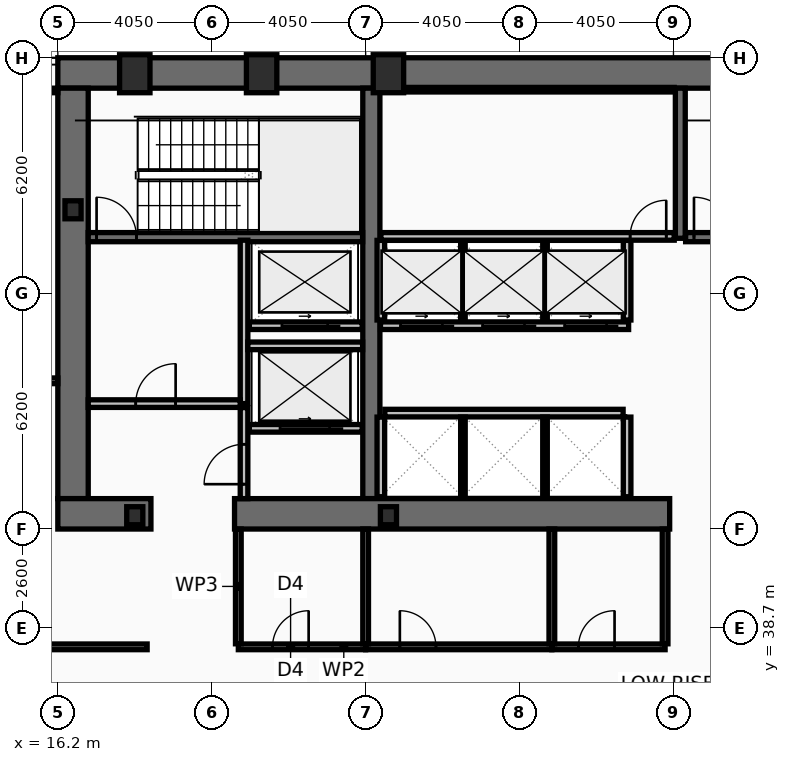
"""IFC4 building model, lengths in metres.
Left out: names, types, materials, properties, quantities, classifications, styles, units other than length and angle.
Written with IfcOpenShell. Run it as: python <this file> out.ifc"""

import sys

from ifc_helpers import new_model, si_unit, direction, frame, frame_2d, origin, origin_2d, place, context, subcontext, project, spatial, rectangle, hollow_rectangle, i_section, extrude, element, fill, save


model = new_model("IFC4")
c1 = context("Model", 3, precision=1e-05, world=origin(), true_north=direction((0.0, 1.0)))
c2 = subcontext(c1, "Body", "Model", "MODEL_VIEW")
j1 = project(units=[si_unit("LENGTHUNIT", "METRE"), si_unit("PLANEANGLEUNIT", "RADIAN")], contexts=[c1])
p1 = place(None, origin())
s1 = spatial("IfcSite", under=j1, at=p1, CompositionType="ELEMENT")
p2 = place(p1, origin())
s2 = spatial("IfcBuilding", under=s1, at=p2, CompositionType="ELEMENT")
p3 = place(p2, frame((0.0, 0.0, 61.8)))
s3 = spatial("IfcBuildingStorey", under=s2, at=p3, CompositionType="ELEMENT", Elevation=61.8)
p4 = place(p3, frame((16.2, 53.3, 0.0), z_axis=(0.0, 0.0, 1.0), x_axis=(1.0, 0.0, 0.0)))
e1 = element("IfcWall", 1, at=p4, inside=s3, PredefinedType="SHEAR", context=c2, shape_type="SweptSolid", body=[
    extrude(rectangle(XDim=40.5, YDim=0.8, at=frame_2d((20.25, 0.0))), origin(), (0.0, 0.0, 1.0), 3.82),
])
p5 = place(p3, frame((16.6, 42.1, 0.0), z_axis=(0.0, 0.0, 1.0), x_axis=(0.0, 1.0, 0.0)))
e2 = element("IfcWall", 2, at=p5, inside=s3, PredefinedType="SHEAR", context=c2, shape_type="SweptSolid", body=[
    extrude(rectangle(XDim=10.8, YDim=0.8, at=frame_2d((5.4, 0.0))), origin(), (0.0, 0.0, 1.0), 3.82),
])
p6 = place(p3, frame((24.45, 42.1, 0.0), z_axis=(0.0, 0.0, 1.0), x_axis=(0.0, 1.0, 0.0)))
e3 = element("IfcWall", 3, at=p6, inside=s3, PredefinedType="SHEAR", context=c2, shape_type="SweptSolid", body=[
    extrude(rectangle(XDim=10.8, YDim=0.45, at=frame_2d((5.4, 0.0))), origin(), (0.0, 0.0, 1.0), 3.82),
])
p7 = place(p3, frame((18.65, 41.7, 0.0), z_axis=(0.0, 0.0, 1.0), x_axis=(-1.0, 0.0, 0.0)))
e4 = element("IfcWall", 4, at=p7, inside=s3, PredefinedType="SHEAR", context=c2, shape_type="SweptSolid", body=[
    extrude(rectangle(XDim=2.45, YDim=0.8, at=frame_2d((1.225, 0.0))), origin(), (0.0, 0.0, 1.0), 3.82),
])
p8 = place(p3, frame((32.3, 41.7, 0.0), z_axis=(0.0, 0.0, 1.0), x_axis=(-1.0, 0.0, 0.0)))
e5 = element("IfcWall", 5, at=p8, inside=s3, PredefinedType="SHEAR", context=c2, shape_type="SweptSolid", body=[
    extrude(rectangle(XDim=11.45, YDim=0.8, at=frame_2d((5.725, 0.0))), origin(), (0.0, 0.0, 1.0), 3.82),
])
p9 = place(p3, frame((32.58, 48.95, 0.0), z_axis=(0.0, 0.0, 1.0), x_axis=(0.0, 1.0, 0.0)))
e6 = element("IfcWall", 6, at=p9, inside=s3, PredefinedType="SHEAR", context=c2, shape_type="SweptSolid", body=[
    extrude(rectangle(XDim=3.95, YDim=0.26, at=frame_2d((1.975, 0.0))), origin(), (0.0, 0.0, 1.0), 3.82),
])
p10 = place(p3, frame((17.0, 48.98, 0.0), z_axis=(0.0, 0.0, 1.0), x_axis=(1.0, 0.0, 0.0)))
e7 = element("IfcWall", 7, at=p10, inside=s3, PredefinedType="SHEAR", context=c2, shape_type="SweptSolid", body=[
    extrude(rectangle(XDim=7.22, YDim=0.24, at=frame_2d((3.61, 0.0))), origin(), (0.0, 0.0, 1.0), 3.82),
])
p11 = place(p10, frame((0.22, 0.0, 0.0)))
e8 = element("IfcOpeningElement", 8, at=p11, cuts=e7, PredefinedType="OPENING", context=c2, shape_type="SweptSolid", body=[
    extrude(rectangle(XDim=1.05, YDim=2.15, at=frame_2d((0.525, 1.075))), frame((0.0, 0.13, 0.0), z_axis=(0.0, -1.0, 0.0), x_axis=(1.0, 0.0, 0.0)), (0.0, 0.0, 1.0), 0.26),
])
p12 = place(p3, frame((32.72, 48.98, 0.0), z_axis=(0.0, 0.0, 1.0), x_axis=(1.0, 0.0, 0.0)))
e9 = element("IfcWall", 9, at=p12, inside=s3, PredefinedType="SHEAR", context=c2, shape_type="SweptSolid", body=[
    extrude(rectangle(XDim=7.56, YDim=0.24, at=frame_2d((3.78, 0.0))), origin(), (0.0, 0.0, 1.0), 3.82),
])
p13 = place(p12, frame((0.22, 0.0, 0.0)))
e10 = element("IfcOpeningElement", 10, at=p13, cuts=e9, PredefinedType="OPENING", context=c2, shape_type="SweptSolid", body=[
    extrude(rectangle(XDim=1.05, YDim=2.15, at=frame_2d((0.525, 1.075))), frame((0.0, 0.13, 0.0), z_axis=(0.0, -1.0, 0.0), x_axis=(1.0, 0.0, 0.0)), (0.0, 0.0, 1.0), 0.26),
])
for number, where, z_axis, x_axis in (
    (11, (18.225, 53.28, 0.0), (0.0, 0.0, 1.0), (1.0, 0.0, 0.0)),
    (12, (21.562, 53.28, 0.0), (0.0, 0.0, 1.0), (1.0, 0.0, 0.0)),
    (13, (24.9, 53.28, 0.0), (0.0, 0.0, 1.0), (1.0, 0.0, 0.0)),
):
    element("IfcColumn", number, at=place(p3, frame(where, z_axis=z_axis, x_axis=x_axis)), inside=s3, PredefinedType="COLUMN", context=c2, shape_type="SweptSolid", body=[
        extrude(hollow_rectangle(XDim=0.8, YDim=1.0, WallThickness=0.055, at=origin_2d()), origin(), (0.0, 0.0, 1.0), 4.0),
    ])
for number, where, z_axis, x_axis in (
    (14, (16.6, 49.7, 0.0), (0.0, 0.0, 1.0), (1.0, 0.0, 0.0)),
    (15, (18.225, 41.65, 0.0), (0.0, 0.0, 1.0), (1.0, 0.0, 0.0)),
    (16, (24.9, 41.65, 0.0), (0.0, 0.0, 1.0), (1.0, 0.0, 0.0)),
):
    element("IfcColumn", number, at=place(p3, frame(where, z_axis=z_axis, x_axis=x_axis)), inside=s3, PredefinedType="COLUMN", context=c2, shape_type="SweptSolid", body=[
        extrude(i_section(OverallWidth=0.424, OverallDepth=0.474, WebThickness=0.048, FlangeThickness=0.077, at=origin_2d()), origin(), (0.0, 0.0, 1.0), 4.0),
    ])
p14 = place(p3, frame((24.21, 43.95, 0.0), z_axis=(0.0, 0.0, 1.0), x_axis=(-1.0, 0.0, 0.0)))
e17 = element("IfcWall", 17, at=p14, inside=s3, PredefinedType="PARTITIONING", context=c2, shape_type="SweptSolid", body=[
    extrude(rectangle(XDim=2.97, YDim=0.2, at=frame_2d((1.485, 0.0))), origin(), (0.0, 0.0, 1.0), 3.82),
])
p15 = place(p14, frame((0.86, 0.0, 0.0)))
e18 = element("IfcOpeningElement", 18, at=p15, cuts=e17, PredefinedType="OPENING", context=c2, shape_type="SweptSolid", body=[
    extrude(rectangle(XDim=1.3, YDim=2.18, at=frame_2d((0.65, 1.09))), frame((0.0, 0.11, 0.0), z_axis=(0.0, -1.0, 0.0), x_axis=(1.0, 0.0, 0.0)), (0.0, 0.0, 1.0), 0.22),
])
p16 = place(p3, frame((24.21, 46.65, 0.0), z_axis=(0.0, 0.0, 1.0), x_axis=(-1.0, 0.0, 0.0)))
e19 = element("IfcWall", 19, at=p16, inside=s3, PredefinedType="PARTITIONING", context=c2, shape_type="SweptSolid", body=[
    extrude(rectangle(XDim=2.97, YDim=0.2, at=frame_2d((1.485, 0.0))), origin(), (0.0, 0.0, 1.0), 3.82),
])
p17 = place(p16, frame((0.91, 0.0, 0.0)))
e20 = element("IfcOpeningElement", 20, at=p17, cuts=e19, PredefinedType="OPENING", context=c2, shape_type="SweptSolid", body=[
    extrude(rectangle(XDim=1.2, YDim=2.18, at=frame_2d((0.6, 1.09))), frame((0.0, 0.11, 0.0), z_axis=(0.0, -1.0, 0.0), x_axis=(1.0, 0.0, 0.0)), (0.0, 0.0, 1.0), 0.22),
])
p18 = place(p3, frame((31.22, 46.65, 0.0), z_axis=(0.0, 0.0, 1.0), x_axis=(-1.0, 0.0, 0.0)))
e21 = element("IfcWall", 21, at=p18, inside=s3, PredefinedType="PARTITIONING", context=c2, shape_type="SweptSolid", body=[
    extrude(rectangle(XDim=6.53, YDim=0.2, at=frame_2d((3.265, 0.0))), origin(), (0.0, 0.0, 1.0), 3.82),
])
p19 = place(p18, frame((4.9, 0.0, 0.0)))
e22 = element("IfcOpeningElement", 22, at=p19, cuts=e21, PredefinedType="OPENING", context=c2, shape_type="SweptSolid", body=[
    extrude(rectangle(XDim=1.1, YDim=2.18, at=frame_2d((0.55, 1.09))), frame((0.0, 0.11, 0.0), z_axis=(0.0, -1.0, 0.0), x_axis=(1.0, 0.0, 0.0)), (0.0, 0.0, 1.0), 0.22),
])
p20 = place(p18, frame((2.74, 0.0, 0.0)))
e23 = element("IfcOpeningElement", 23, at=p20, cuts=e21, PredefinedType="OPENING", context=c2, shape_type="SweptSolid", body=[
    extrude(rectangle(XDim=1.1, YDim=2.18, at=frame_2d((0.55, 1.09))), frame((0.0, 0.11, 0.0), z_axis=(0.0, -1.0, 0.0), x_axis=(1.0, 0.0, 0.0)), (0.0, 0.0, 1.0), 0.22),
])
p21 = place(p18, frame((0.58, 0.0, 0.0)))
e24 = element("IfcOpeningElement", 24, at=p21, cuts=e21, PredefinedType="OPENING", context=c2, shape_type="SweptSolid", body=[
    extrude(rectangle(XDim=1.1, YDim=2.18, at=frame_2d((0.55, 1.09))), frame((0.0, 0.11, 0.0), z_axis=(0.0, -1.0, 0.0), x_axis=(1.0, 0.0, 0.0)), (0.0, 0.0, 1.0), 0.22),
])
p22 = place(p3, frame((21.1, 44.6, 0.0), z_axis=(0.0, 0.0, 1.0), x_axis=(0.0, 1.0, 0.0)))
e25 = element("IfcWall", 25, at=p22, inside=s3, PredefinedType="PARTITIONING", context=c2, shape_type="SweptSolid", body=[
    extrude(rectangle(XDim=4.3, YDim=0.2, at=frame_2d((2.15, 0.0))), origin(), (0.0, 0.0, 1.0), 3.82),
])
p23 = place(p3, frame((17.0, 44.6, 0.0), z_axis=(0.0, 0.0, 1.0), x_axis=(1.0, 0.0, 0.0)))
e26 = element("IfcWall", 26, at=p23, inside=s3, PredefinedType="PARTITIONING", context=c2, shape_type="SweptSolid", body=[
    extrude(rectangle(XDim=4.0, YDim=0.2, at=frame_2d((2.0, 0.0))), origin(), (0.0, 0.0, 1.0), 3.82),
])
p24 = place(p23, frame((1.25, 0.0, 0.0)))
e27 = element("IfcOpeningElement", 27, at=p24, cuts=e26, PredefinedType="OPENING", context=c2, shape_type="SweptSolid", body=[
    extrude(rectangle(XDim=1.05, YDim=2.15, at=frame_2d((0.525, 1.075))), frame((0.0, 0.11, 0.0), z_axis=(0.0, -1.0, 0.0), x_axis=(1.0, 0.0, 0.0)), (0.0, 0.0, 1.0), 0.22),
])
p25 = place(p3, frame((21.2, 46.12, 0.0), z_axis=(0.0, 0.0, 1.0), x_axis=(1.0, 0.0, 0.0)))
e28 = element("IfcWall", 28, at=p25, inside=s3, PredefinedType="PARTITIONING", context=c2, shape_type="SweptSolid", body=[
    extrude(rectangle(XDim=3.02, YDim=0.2, at=frame_2d((1.51, 0.0))), origin(), (0.0, 0.0, 1.0), 3.82),
])
p26 = place(p3, frame((21.1, 42.1, 0.0), z_axis=(0.0, 0.0, 1.0), x_axis=(0.0, 1.0, 0.0)))
e29 = element("IfcWall", 29, at=p26, inside=s3, PredefinedType="PARTITIONING", context=c2, shape_type="SweptSolid", body=[
    extrude(rectangle(XDim=2.395, YDim=0.2, at=frame_2d((1.198, 0.0))), origin(), (0.0, 0.0, 1.0), 3.82),
])
p27 = place(p26, frame((0.38, 0.0, 0.0)))
e30 = element("IfcOpeningElement", 30, at=p27, cuts=e29, PredefinedType="OPENING", context=c2, shape_type="SweptSolid", body=[
    extrude(rectangle(XDim=1.05, YDim=2.15, at=frame_2d((0.525, 1.075))), frame((0.0, 0.11, 0.0), z_axis=(0.0, -1.0, 0.0), x_axis=(1.0, 0.0, 0.0)), (0.0, 0.0, 1.0), 0.22),
])
for number, where, z_axis, x_axis in (
    (31, (24.7, 46.8, 0.0), (0.0, 0.0, 1.0), (0.0, 1.0, 0.0)),
    (32, (31.18, 46.8, 0.0), (0.0, 0.0, 1.0), (0.0, 1.0, 0.0)),
):
    element("IfcWall", number, at=place(p3, frame(where, z_axis=z_axis, x_axis=x_axis)), inside=s3, PredefinedType="PARTITIONING", context=c2, shape_type="SweptSolid", body=[
        extrude(rectangle(XDim=2.095, YDim=0.2, at=frame_2d((1.047, 0.0))), origin(), (0.0, 0.0, 1.0), 3.82),
    ])
for number, where, z_axis, x_axis in (
    (33, (26.86, 46.8, 0.0), (0.0, 0.0, 1.0), (0.0, 1.0, 0.0)),
    (34, (29.02, 46.8, 0.0), (0.0, 0.0, 1.0), (0.0, 1.0, 0.0)),
):
    element("IfcWall", number, at=place(p3, frame(where, z_axis=z_axis, x_axis=x_axis)), inside=s3, PredefinedType="PARTITIONING", context=c2, shape_type="SweptSolid", body=[
        extrude(rectangle(XDim=2.095, YDim=0.12, at=frame_2d((1.047, 0.0))), origin(), (0.0, 0.0, 1.0), 3.82),
    ])
p28 = place(p3, frame((24.805, 44.35, 0.0), z_axis=(0.0, 0.0, 1.0), x_axis=(1.0, 0.0, 0.0)))
e35 = element("IfcWall", 35, at=p28, inside=s3, PredefinedType="PARTITIONING", context=c2, shape_type="SweptSolid", body=[
    extrude(rectangle(XDim=6.27, YDim=0.2, at=frame_2d((3.135, 0.0))), origin(), (0.0, 0.0, 1.0), 3.82),
])
for number, where, z_axis, x_axis in (
    (36, (24.7, 42.15, 0.0), (0.0, 0.0, 1.0), (0.0, 1.0, 0.0)),
    (37, (31.18, 42.15, 0.0), (0.0, 0.0, 1.0), (0.0, 1.0, 0.0)),
):
    element("IfcWall", number, at=place(p3, frame(where, z_axis=z_axis, x_axis=x_axis)), inside=s3, PredefinedType="PARTITIONING", context=c2, shape_type="SweptSolid", body=[
        extrude(rectangle(XDim=2.095, YDim=0.2, at=frame_2d((1.048, 0.0))), origin(), (0.0, 0.0, 1.0), 3.82),
    ])
for number, where, z_axis, x_axis in (
    (38, (26.86, 42.15, 0.0), (0.0, 0.0, 1.0), (0.0, 1.0, 0.0)),
    (39, (29.02, 42.15, 0.0), (0.0, 0.0, 1.0), (0.0, 1.0, 0.0)),
):
    element("IfcWall", number, at=place(p3, frame(where, z_axis=z_axis, x_axis=x_axis)), inside=s3, PredefinedType="PARTITIONING", context=c2, shape_type="SweptSolid", body=[
        extrude(rectangle(XDim=2.095, YDim=0.12, at=frame_2d((1.048, 0.0))), origin(), (0.0, 0.0, 1.0), 3.82),
    ])
p29 = place(p3, frame((24.7, 52.86, 0.0), z_axis=(0.0, 0.0, 1.0), x_axis=(1.0, 0.0, 0.0)))
e40 = element("IfcWall", 40, at=p29, inside=s3, PredefinedType="PARTITIONING", context=c2, shape_type="SweptSolid", body=[
    extrude(rectangle(XDim=7.72, YDim=0.12, at=frame_2d((3.86, 0.0))), origin(), (0.0, 0.0, 1.0), 3.82),
])
p30 = place(p3, frame((24.7, 49.0, 0.0), z_axis=(0.0, 0.0, 1.0), x_axis=(1.0, 0.0, 0.0)))
e41 = element("IfcWall", 41, at=p30, inside=s3, PredefinedType="PARTITIONING", context=c2, shape_type="SweptSolid", body=[
    extrude(rectangle(XDim=7.72, YDim=0.2, at=frame_2d((3.86, 0.0))), origin(), (0.0, 0.0, 1.0), 3.82),
])
p31 = place(p30, frame((6.56, 0.0, 0.0)))
e42 = element("IfcOpeningElement", 42, at=p31, cuts=e41, PredefinedType="OPENING", context=c2, shape_type="SweptSolid", body=[
    extrude(rectangle(XDim=0.95, YDim=2.1, at=frame_2d((0.475, 1.05))), frame((0.0, 0.11, 0.0), z_axis=(0.0, -1.0, 0.0), x_axis=(1.0, 0.0, 0.0)), (0.0, 0.0, 1.0), 0.22),
])
p32 = place(p3, frame((20.95, 38.2, 0.0), z_axis=(0.0, 0.0, 1.0), x_axis=(1.0, 0.0, 0.0)))
e43 = element("IfcWall", 43, at=p32, inside=s3, PredefinedType="PARTITIONING", context=c2, shape_type="SweptSolid", body=[
    extrude(rectangle(XDim=3.35, YDim=0.15, at=frame_2d((1.675, 0.0))), origin(), (0.0, 0.0, 1.0), 3.82),
])
p33 = place(p32, frame((0.9, 0.0, 0.0)))
e44 = element("IfcOpeningElement", 44, at=p33, cuts=e43, PredefinedType="OPENING", context=c2, shape_type="SweptSolid", body=[
    extrude(rectangle(XDim=0.95, YDim=2.05, at=frame_2d((0.475, 1.025))), frame((0.0, 0.085, 0.0), z_axis=(0.0, -1.0, 0.0), x_axis=(1.0, 0.0, 0.0)), (0.0, 0.0, 1.0), 0.17),
])
p34 = place(p3, frame((24.3, 38.2, 0.0), z_axis=(0.0, 0.0, 1.0), x_axis=(1.0, 0.0, 0.0)))
e45 = element("IfcWall", 45, at=p34, inside=s3, PredefinedType="PARTITIONING", context=c2, shape_type="SweptSolid", body=[
    extrude(rectangle(XDim=4.9, YDim=0.15, at=frame_2d((2.45, 0.0))), origin(), (0.0, 0.0, 1.0), 3.01),
])
p35 = place(p34, frame((0.9, 0.0, 0.0)))
e46 = element("IfcOpeningElement", 46, at=p35, cuts=e45, PredefinedType="OPENING", context=c2, shape_type="SweptSolid", body=[
    extrude(rectangle(XDim=0.95, YDim=2.05, at=frame_2d((0.475, 1.025))), frame((0.0, 0.085, 0.0), z_axis=(0.0, -1.0, 0.0), x_axis=(1.0, 0.0, 0.0)), (0.0, 0.0, 1.0), 0.17),
])
p36 = place(p3, frame((29.2, 38.2, 0.0), z_axis=(0.0, 0.0, 1.0), x_axis=(1.0, 0.0, 0.0)))
e47 = element("IfcWall", 47, at=p36, inside=s3, PredefinedType="PARTITIONING", context=c2, shape_type="SweptSolid", body=[
    extrude(rectangle(XDim=2.98, YDim=0.15, at=frame_2d((1.49, 0.0))), origin(), (0.0, 0.0, 1.0), 3.01),
])
p37 = place(p36, frame((0.7, 0.0, 0.0)))
e48 = element("IfcOpeningElement", 48, at=p37, cuts=e47, PredefinedType="OPENING", context=c2, shape_type="SweptSolid", body=[
    extrude(rectangle(XDim=0.95, YDim=2.05, at=frame_2d((0.475, 1.025))), frame((0.0, 0.085, 0.0), z_axis=(0.0, -1.0, 0.0), x_axis=(1.0, 0.0, 0.0)), (0.0, 0.0, 1.0), 0.17),
])
for number, where, z_axis, x_axis in (
    (49, (20.95, 38.28, 0.0), (0.0, 0.0, 1.0), (0.0, 1.0, 0.0)),
    (50, (24.3, 38.28, 0.0), (0.0, 0.0, 1.0), (0.0, 1.0, 0.0)),
    (51, (29.2, 38.28, 0.0), (0.0, 0.0, 1.0), (0.0, 1.0, 0.0)),
    (52, (32.18, 38.28, 0.0), (0.0, 0.0, 1.0), (0.0, 1.0, 0.0)),
):
    element("IfcWall", number, at=place(p3, frame(where, z_axis=z_axis, x_axis=x_axis)), inside=s3, PredefinedType="PARTITIONING", context=c2, shape_type="SweptSolid", body=[
        extrude(rectangle(XDim=3.02, YDim=0.15, at=frame_2d((1.51, 0.0))), origin(), (0.0, 0.0, 1.0), 3.82),
    ])
p38 = place(p3, frame((2.03, 38.2, 0.0), z_axis=(0.0, 0.0, 1.0), x_axis=(1.0, 0.0, 0.0)))
e53 = element("IfcWall", 53, at=p38, inside=s3, PredefinedType="PARTITIONING", context=c2, shape_type="SweptSolid", body=[
    extrude(rectangle(XDim=16.52, YDim=0.15, at=frame_2d((8.26, 0.0))), origin(), (0.0, 0.0, 1.0), 3.01),
])
p39 = place(p38, frame((12.32, 0.0, 0.0)))
e54 = element("IfcOpeningElement", 54, at=p39, cuts=e53, PredefinedType="OPENING", context=c2, shape_type="SweptSolid", body=[
    extrude(rectangle(XDim=0.95, YDim=2.05, at=frame_2d((0.475, 1.025))), frame((0.0, 0.085, 0.0), z_axis=(0.0, -1.0, 0.0), x_axis=(1.0, 0.0, 0.0)), (0.0, 0.0, 1.0), 0.17),
])
p40 = place(p3, frame((2.095, 45.2, 0.0), z_axis=(0.0, 0.0, 1.0), x_axis=(1.0, 0.0, 0.0)))
e55 = element("IfcWall", 55, at=p40, inside=s3, PredefinedType="PARTITIONING", context=c2, shape_type="SweptSolid", body=[
    extrude(rectangle(XDim=14.105, YDim=0.15, at=frame_2d((7.052, 0.0))), origin(), (0.0, 0.0, 1.0), 3.16),
])
p41 = place(p40, frame((12.32, 0.0, 0.0)))
e56 = element("IfcOpeningElement", 56, at=p41, cuts=e55, PredefinedType="OPENING", context=c2, shape_type="SweptSolid", body=[
    extrude(rectangle(XDim=0.9, YDim=2.05, at=frame_2d((0.45, 1.025))), frame((0.0, 0.085, 0.0), z_axis=(0.0, -1.0, 0.0), x_axis=(1.0, 0.0, 0.0)), (0.0, 0.0, 1.0), 0.17),
])
p42 = place(p3, frame((2.095, 52.84, 0.0), z_axis=(0.0, 0.0, 1.0), x_axis=(1.0, 0.0, 0.0)))
e57 = element("IfcWall", 57, at=p42, inside=s3, PredefinedType="PARTITIONING", context=c2, shape_type="SweptSolid", body=[
    extrude(rectangle(XDim=14.105, YDim=0.12, at=frame_2d((7.052, 0.0))), origin(), (0.0, 0.0, 1.0), 3.82),
])
p43 = place(p11, origin())
e58 = element("IfcDoor", 58, at=p43, inside=s3, OperationType="SINGLE_SWING_LEFT", PredefinedType="DOOR", context=c2, shape_type="SweptSolid", body=[
    extrude(rectangle(XDim=1.05, YDim=2.15, at=frame_2d((0.525, 1.075))), frame((0.0, 0.025, 0.0), z_axis=(0.0, -1.0, 0.0), x_axis=(1.0, 0.0, 0.0)), (0.0, 0.0, 1.0), 0.05),
])
fill(e8, e58)
p44 = place(p13, origin())
e59 = element("IfcDoor", 59, at=p44, inside=s3, OperationType="SINGLE_SWING_LEFT", PredefinedType="DOOR", context=c2, shape_type="SweptSolid", body=[
    extrude(rectangle(XDim=1.05, YDim=2.15, at=frame_2d((0.525, 1.075))), frame((0.0, 0.025, 0.0), z_axis=(0.0, -1.0, 0.0), x_axis=(1.0, 0.0, 0.0)), (0.0, 0.0, 1.0), 0.05),
])
fill(e10, e59)
p45 = place(p15, origin())
e60 = element("IfcDoor", 60, at=p45, inside=s3, OperationType="SLIDING_TO_LEFT", PredefinedType="DOOR", context=c2, shape_type="SweptSolid", body=[
    extrude(rectangle(XDim=1.3, YDim=2.18, at=frame_2d((0.65, 1.09))), frame((0.0, 0.025, 0.0), z_axis=(0.0, -1.0, 0.0), x_axis=(1.0, 0.0, 0.0)), (0.0, 0.0, 1.0), 0.05),
])
fill(e18, e60)
p46 = place(p17, origin())
e61 = element("IfcDoor", 61, at=p46, inside=s3, OperationType="SLIDING_TO_LEFT", PredefinedType="DOOR", context=c2, shape_type="SweptSolid", body=[
    extrude(rectangle(XDim=1.2, YDim=2.18, at=frame_2d((0.6, 1.09))), frame((0.0, 0.025, 0.0), z_axis=(0.0, -1.0, 0.0), x_axis=(1.0, 0.0, 0.0)), (0.0, 0.0, 1.0), 0.05),
])
fill(e20, e61)
p47 = place(p19, origin())
e62 = element("IfcDoor", 62, at=p47, inside=s3, OperationType="SLIDING_TO_LEFT", PredefinedType="DOOR", context=c2, shape_type="SweptSolid", body=[
    extrude(rectangle(XDim=1.1, YDim=2.18, at=frame_2d((0.55, 1.09))), frame((0.0, 0.025, 0.0), z_axis=(0.0, -1.0, 0.0), x_axis=(1.0, 0.0, 0.0)), (0.0, 0.0, 1.0), 0.05),
])
fill(e22, e62)
p48 = place(p20, origin())
e63 = element("IfcDoor", 63, at=p48, inside=s3, OperationType="SLIDING_TO_LEFT", PredefinedType="DOOR", context=c2, shape_type="SweptSolid", body=[
    extrude(rectangle(XDim=1.1, YDim=2.18, at=frame_2d((0.55, 1.09))), frame((0.0, 0.025, 0.0), z_axis=(0.0, -1.0, 0.0), x_axis=(1.0, 0.0, 0.0)), (0.0, 0.0, 1.0), 0.05),
])
fill(e23, e63)
p49 = place(p21, origin())
e64 = element("IfcDoor", 64, at=p49, inside=s3, OperationType="SLIDING_TO_LEFT", PredefinedType="DOOR", context=c2, shape_type="SweptSolid", body=[
    extrude(rectangle(XDim=1.1, YDim=2.18, at=frame_2d((0.55, 1.09))), frame((0.0, 0.025, 0.0), z_axis=(0.0, -1.0, 0.0), x_axis=(1.0, 0.0, 0.0)), (0.0, 0.0, 1.0), 0.05),
])
fill(e24, e64)
p50 = place(p24, origin())
e65 = element("IfcDoor", 65, at=p50, inside=s3, OperationType="SINGLE_SWING_RIGHT", PredefinedType="DOOR", context=c2, shape_type="SweptSolid", body=[
    extrude(rectangle(XDim=1.05, YDim=2.15, at=frame_2d((0.525, 1.075))), frame((0.0, 0.025, 0.0), z_axis=(0.0, -1.0, 0.0), x_axis=(1.0, 0.0, 0.0)), (0.0, 0.0, 1.0), 0.05),
])
fill(e27, e65)
p51 = place(p27, origin())
e66 = element("IfcDoor", 66, at=p51, inside=s3, OperationType="SINGLE_SWING_LEFT", PredefinedType="DOOR", context=c2, shape_type="SweptSolid", body=[
    extrude(rectangle(XDim=1.05, YDim=2.15, at=frame_2d((0.525, 1.075))), frame((0.0, 0.025, 0.0), z_axis=(0.0, -1.0, 0.0), x_axis=(1.0, 0.0, 0.0)), (0.0, 0.0, 1.0), 0.05),
])
fill(e30, e66)
p52 = place(p31, origin())
e67 = element("IfcDoor", 67, at=p52, inside=s3, OperationType="SINGLE_SWING_RIGHT", PredefinedType="DOOR", context=c2, shape_type="SweptSolid", body=[
    extrude(rectangle(XDim=0.95, YDim=2.1, at=frame_2d((0.475, 1.05))), frame((0.0, 0.025, 0.0), z_axis=(0.0, -1.0, 0.0), x_axis=(1.0, 0.0, 0.0)), (0.0, 0.0, 1.0), 0.05),
])
fill(e42, e67)
p53 = place(p33, origin())
e68 = element("IfcDoor", 68, at=p53, inside=s3, OperationType="SINGLE_SWING_RIGHT", PredefinedType="DOOR", context=c2, shape_type="SweptSolid", body=[
    extrude(rectangle(XDim=0.95, YDim=2.05, at=frame_2d((0.475, 1.025))), frame((0.0, 0.025, 0.0), z_axis=(0.0, -1.0, 0.0), x_axis=(1.0, 0.0, 0.0)), (0.0, 0.0, 1.0), 0.05),
])
fill(e44, e68)
p54 = place(p35, origin())
e69 = element("IfcDoor", 69, at=p54, inside=s3, OperationType="SINGLE_SWING_LEFT", PredefinedType="DOOR", context=c2, shape_type="SweptSolid", body=[
    extrude(rectangle(XDim=0.95, YDim=2.05, at=frame_2d((0.475, 1.025))), frame((0.0, 0.025, 0.0), z_axis=(0.0, -1.0, 0.0), x_axis=(1.0, 0.0, 0.0)), (0.0, 0.0, 1.0), 0.05),
])
fill(e46, e69)
p55 = place(p37, origin())
e70 = element("IfcDoor", 70, at=p55, inside=s3, OperationType="SINGLE_SWING_RIGHT", PredefinedType="DOOR", context=c2, shape_type="SweptSolid", body=[
    extrude(rectangle(XDim=0.95, YDim=2.05, at=frame_2d((0.475, 1.025))), frame((0.0, 0.025, 0.0), z_axis=(0.0, -1.0, 0.0), x_axis=(1.0, 0.0, 0.0)), (0.0, 0.0, 1.0), 0.05),
])
fill(e48, e70)
save(model, sys.argv[1])
